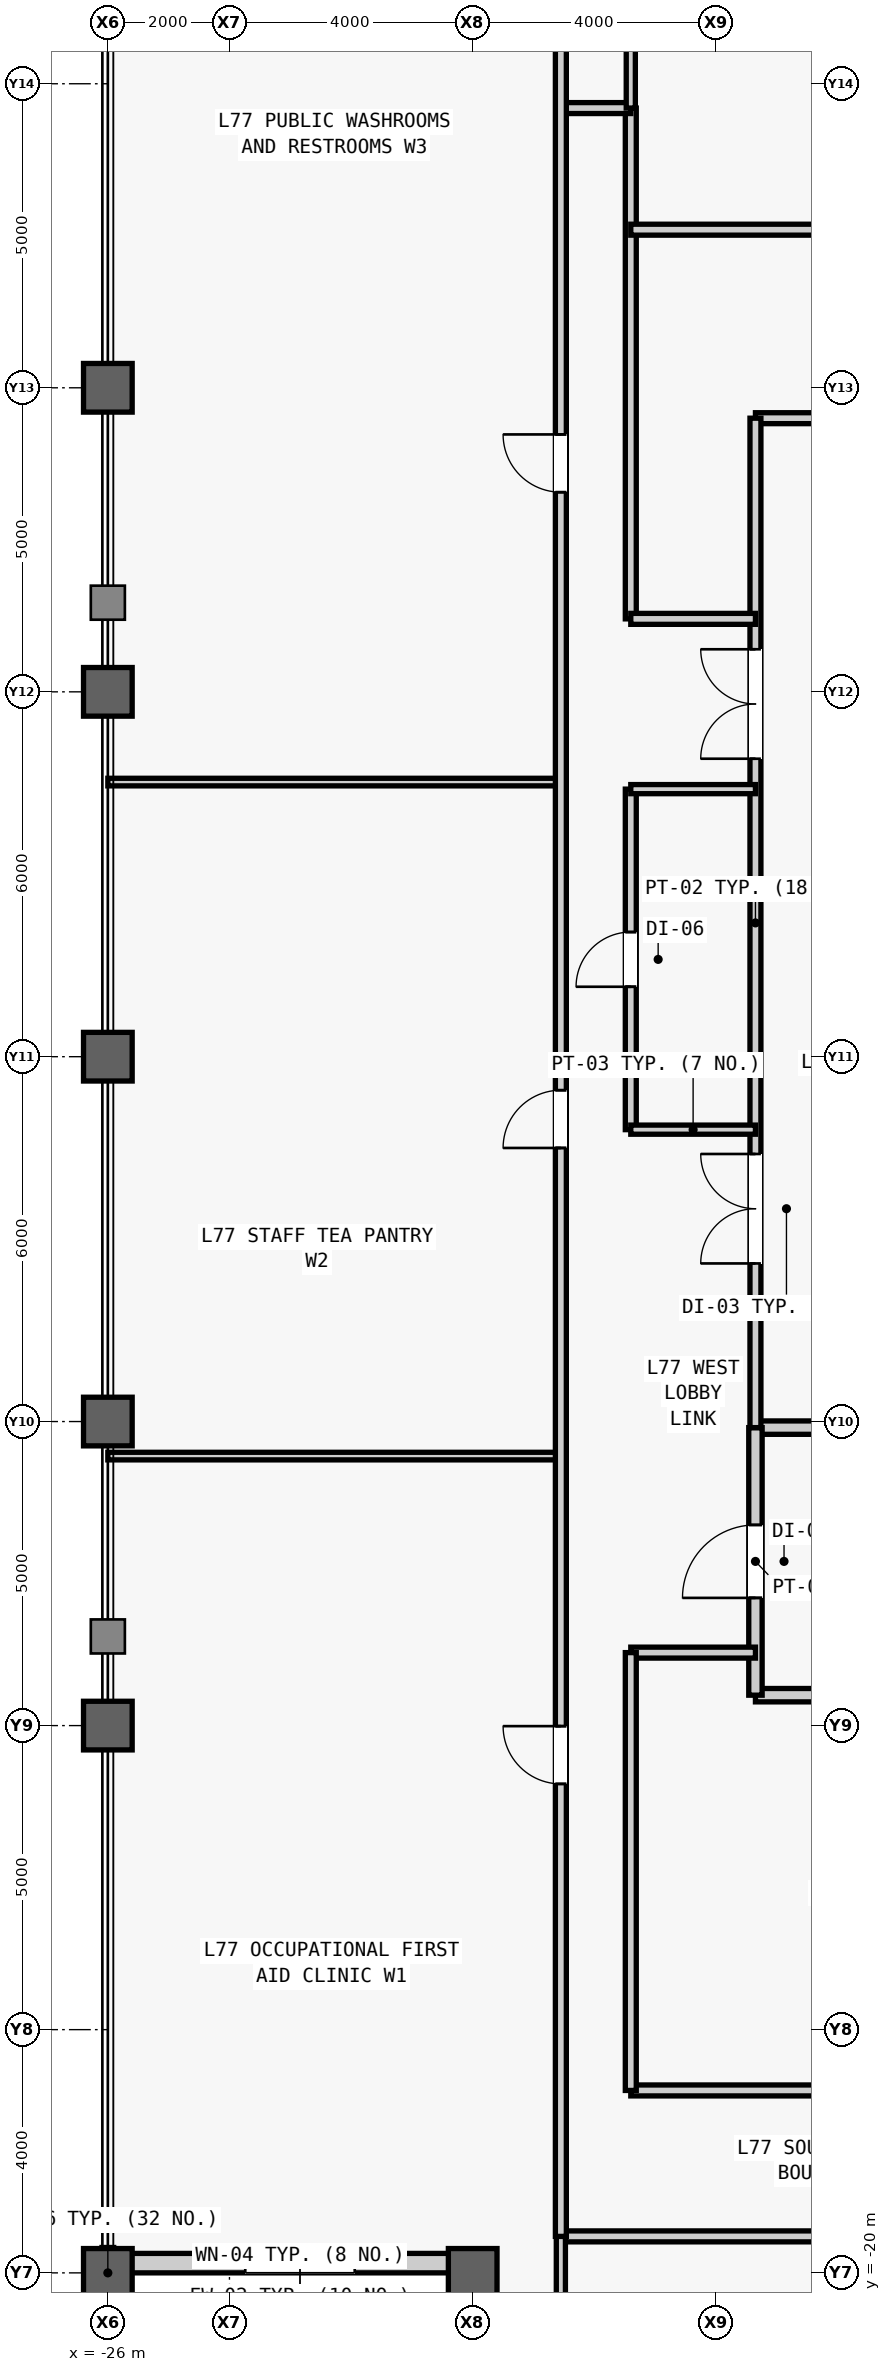
"""IFC4 building model, lengths in metres.
Left out: names, types, materials, properties, quantities, classifications, styles, units other than length and angle.
Written with IfcOpenShell. Run it as: python <this file> out.ifc"""

import sys

from ifc_helpers import new_model, si_unit, direction, frame, frame_2d, origin, origin_2d, place, context, subcontext, project, spatial, rectangle, hollow_rectangle, extrude, source, transform, mapped, element, fill, save


model = new_model("IFC4")
c1 = context("Model", 3, precision=1e-05, world=origin(), true_north=direction((0.0, 1.0)))
c2 = subcontext(c1, "Body", "Model", "MODEL_VIEW")
j1 = project(units=[si_unit("LENGTHUNIT", "METRE"), si_unit("PLANEANGLEUNIT", "RADIAN")], contexts=[c1])
p1 = place(None, origin())
s1 = spatial("IfcSite", under=j1, at=p1, CompositionType="ELEMENT")
p2 = place(p1, origin())
s2 = spatial("IfcBuilding", under=s1, at=p2, CompositionType="ELEMENT")
p3 = place(p2, frame((0.0, 0.0, 326.3)))
s3 = spatial("IfcBuildingStorey", under=s2, at=p3, CompositionType="ELEMENT", Elevation=326.3)
m1 = source(origin(), c2, "Body", "SweptSolid", [
    extrude(hollow_rectangle(XDim=0.8, YDim=0.8, WallThickness=0.045, at=origin_2d()), origin(), (0.0, 0.0, 1.0), 4.0),
])
for number, where, z_axis, x_axis in (
    (1, (-26.0, -20.0, 0.0), (0.0, 0.0, 1.0), (1.0, 0.0, 0.0)),
    (2, (-26.0, -11.0, 0.0), (0.0, 0.0, 1.0), (1.0, 0.0, 0.0)),
    (3, (-26.0, -6.0, 0.0), (0.0, 0.0, 1.0), (1.0, 0.0, 0.0)),
    (4, (-26.0, 0.0, 0.0), (0.0, 0.0, 1.0), (1.0, 0.0, 0.0)),
    (5, (-26.0, 6.0, 0.0), (0.0, 0.0, 1.0), (1.0, 0.0, 0.0)),
    (6, (-26.0, 11.0, 0.0), (0.0, 0.0, 1.0), (1.0, 0.0, 0.0)),
    (7, (-20.0, -20.0, 0.0), (0.0, 0.0, 1.0), (1.0, 0.0, 0.0)),
):
    element("IfcColumn", number, at=place(p3, frame(where, z_axis=z_axis, x_axis=x_axis)), inside=s3, PredefinedType="COLUMN", context=c2, shape_type="MappedRepresentation", body=[
        mapped(m1, transform((0.0, 0.0, 0.0), scale=1.0)),
    ])
m2 = source(origin(), c2, "Body", "SweptSolid", [
    extrude(rectangle(XDim=5.68, YDim=0.32, at=frame_2d((2.84, 0.0))), origin(), (0.0, 0.0, 1.0), 3.191),
])
p4 = place(p3, frame((-20.0, -19.84, 0.0), z_axis=(0.0, 0.0, 1.0), x_axis=(-1.0, 0.0, 0.0)))
e8 = element("IfcWall", 8, at=p4, inside=s3, PredefinedType="STANDARD", context=c2, shape_type="MappedRepresentation", body=[
    mapped(m2, transform((0.0, 0.0, 0.0), scale=1.0)),
])
m3 = source(origin(), c2, "Body", "SweptSolid", [
    extrude(rectangle(XDim=1.8, YDim=2.4, at=frame_2d((0.9, 1.2))), frame((0.0, 0.17, 0.0), z_axis=(0.0, -1.0, 0.0), x_axis=(1.0, 0.0, 0.0)), (0.0, 0.0, 1.0), 0.34),
])
p5 = place(p4, frame((1.94, 0.0, 0.5)))
e9 = element("IfcOpeningElement", 9, at=p5, cuts=e8, PredefinedType="OPENING", context=c2, shape_type="MappedRepresentation", body=[
    mapped(m3, transform((0.0, 0.0, 0.0), scale=1.0)),
])
p6 = place(p3, frame((-19.84, -25.68, 0.0), z_axis=(0.0, 0.0, 1.0), x_axis=(0.0, 1.0, 0.0)))
e10 = element("IfcWall", 10, at=p6, inside=s3, PredefinedType="STANDARD", context=c2, shape_type="MappedRepresentation", body=[
    mapped(m2, transform((0.0, 0.0, 0.0), scale=1.0)),
])
p7 = place(p6, frame((1.94, 0.0, 0.5)))
e11 = element("IfcOpeningElement", 11, at=p7, cuts=e10, PredefinedType="OPENING", context=c2, shape_type="MappedRepresentation", body=[
    mapped(m3, transform((0.0, 0.0, 0.0), scale=1.0)),
])
m4 = source(origin(), c2, "Body", "SweptSolid", [
    extrude(rectangle(XDim=4.05, YDim=0.22, at=frame_2d((2.025, 0.0))), origin(), (0.0, 0.0, 1.0), 3.74),
])
p8 = place(p3, frame((-15.35, -10.5, 0.0), z_axis=(0.0, 0.0, 1.0), x_axis=(1.0, 0.0, 0.0)))
e12 = element("IfcWall", 12, at=p8, inside=s3, PredefinedType="PARTITIONING", context=c2, shape_type="MappedRepresentation", body=[
    mapped(m4, transform((0.0, 0.0, 0.0), scale=1.0)),
])
m5 = source(origin(), c2, "Body", "SweptSolid", [
    extrude(rectangle(XDim=4.05, YDim=0.22, at=frame_2d((2.025, 0.0))), origin(), (0.0, 0.0, 1.0), 3.124),
])
p9 = place(p3, frame((-15.35, -6.1, 0.0), z_axis=(0.0, 0.0, 1.0), x_axis=(1.0, 0.0, 0.0)))
e13 = element("IfcWall", 13, at=p9, inside=s3, PredefinedType="PARTITIONING", context=c2, shape_type="MappedRepresentation", body=[
    mapped(m5, transform((0.0, 0.0, 0.0), scale=1.0)),
])
m6 = source(origin(), c2, "Body", "SweptSolid", [
    extrude(rectangle(XDim=4.4, YDim=0.22, at=frame_2d((2.2, 0.0))), origin(), (0.0, 0.0, 1.0), 3.74),
])
p10 = place(p3, frame((-15.35, -10.5, 0.0), z_axis=(0.0, 0.0, 1.0), x_axis=(0.0, 1.0, 0.0)))
e14 = element("IfcWall", 14, at=p10, inside=s3, PredefinedType="PARTITIONING", context=c2, shape_type="MappedRepresentation", body=[
    mapped(m6, transform((0.0, 0.0, 0.0), scale=1.0)),
])
m7 = source(origin(), c2, "Body", "SweptSolid", [
    extrude(rectangle(XDim=1.2, YDim=2.2, at=frame_2d((0.6, 1.1))), frame((0.0, 0.12, 0.0), z_axis=(0.0, -1.0, 0.0), x_axis=(1.0, 0.0, 0.0)), (0.0, 0.0, 1.0), 0.24),
])
p11 = place(p10, frame((1.6, 0.0, 0.0)))
e15 = element("IfcOpeningElement", 15, at=p11, cuts=e14, PredefinedType="OPENING", context=c2, shape_type="MappedRepresentation", body=[
    mapped(m7, transform((0.0, 0.0, 0.0), scale=1.0)),
])
m8 = source(origin(), c2, "Body", "SweptSolid", [
    extrude(rectangle(XDim=4.05, YDim=0.18, at=frame_2d((2.025, 0.0))), origin(), (0.0, 0.0, 1.0), 3.74),
])
p12 = place(p3, frame((-15.35, 10.5, 0.0), z_axis=(0.0, 0.0, 1.0), x_axis=(1.0, 0.0, 0.0)))
e16 = element("IfcWall", 16, at=p12, inside=s3, PredefinedType="PARTITIONING", context=c2, shape_type="MappedRepresentation", body=[
    mapped(m8, transform((0.0, 0.0, 0.0), scale=1.0)),
])
m9 = source(origin(), c2, "Body", "SweptSolid", [
    extrude(rectangle(XDim=16.6, YDim=0.18, at=frame_2d((8.3, 0.0))), origin(), (0.0, 0.0, 1.0), 3.74),
])
p13 = place(p3, frame((-15.35, -6.1, 0.0), z_axis=(0.0, 0.0, 1.0), x_axis=(0.0, 1.0, 0.0)))
e17 = element("IfcWall", 17, at=p13, inside=s3, PredefinedType="PARTITIONING", context=c2, shape_type="MappedRepresentation", body=[
    mapped(m9, transform((0.0, 0.0, 0.0), scale=1.0)),
])
m10 = source(origin(), c2, "Body", "SweptSolid", [
    extrude(rectangle(XDim=1.8, YDim=2.25, at=frame_2d((0.9, 1.125))), frame((0.0, 0.1, 0.0), z_axis=(0.0, -1.0, 0.0), x_axis=(1.0, 0.0, 0.0)), (0.0, 0.0, 1.0), 0.2),
])
p14 = place(p13, frame((2.7, 0.0, 0.0)))
e18 = element("IfcOpeningElement", 18, at=p14, cuts=e17, PredefinedType="OPENING", context=c2, shape_type="MappedRepresentation", body=[
    mapped(m10, transform((0.0, 0.0, 0.0), scale=1.0)),
])
p15 = place(p13, frame((11.0, 0.0, 0.0)))
e19 = element("IfcOpeningElement", 19, at=p15, cuts=e17, PredefinedType="OPENING", context=c2, shape_type="MappedRepresentation", body=[
    mapped(m10, transform((0.0, 0.0, 0.0), scale=1.0)),
])
m11 = source(origin(), c2, "Body", "SweptSolid", [
    extrude(rectangle(XDim=5.6, YDim=0.18, at=frame_2d((2.8, 0.0))), origin(), (0.0, 0.0, 1.0), 3.74),
])
p16 = place(p3, frame((-17.4, -1.2, 0.0), z_axis=(0.0, 0.0, 1.0), x_axis=(0.0, 1.0, 0.0)))
e20 = element("IfcWall", 20, at=p16, inside=s3, PredefinedType="PARTITIONING", context=c2, shape_type="MappedRepresentation", body=[
    mapped(m11, transform((0.0, 0.0, 0.0), scale=1.0)),
])
m12 = source(origin(), c2, "Body", "SweptSolid", [
    extrude(rectangle(XDim=0.9, YDim=2.15, at=frame_2d((0.45, 1.075))), frame((0.0, 0.1, 0.0), z_axis=(0.0, -1.0, 0.0), x_axis=(1.0, 0.0, 0.0)), (0.0, 0.0, 1.0), 0.2),
])
p17 = place(p16, frame((2.35, 0.0, 0.0)))
e21 = element("IfcOpeningElement", 21, at=p17, cuts=e20, PredefinedType="OPENING", context=c2, shape_type="MappedRepresentation", body=[
    mapped(m12, transform((0.0, 0.0, 0.0), scale=1.0)),
])
m13 = source(origin(), c2, "Body", "SweptSolid", [
    extrude(rectangle(XDim=2.05, YDim=0.15, at=frame_2d((1.025, 0.0))), origin(), (0.0, 0.0, 1.0), 3.74),
])
for number, where, z_axis, x_axis in (
    (22, (-17.4, -1.2, 0.0), (0.0, 0.0, 1.0), (1.0, 0.0, 0.0)),
    (23, (-17.4, 4.4, 0.0), (0.0, 0.0, 1.0), (1.0, 0.0, 0.0)),
):
    element("IfcWall", number, at=place(p3, frame(where, z_axis=z_axis, x_axis=x_axis)), inside=s3, PredefinedType="PARTITIONING", context=c2, shape_type="MappedRepresentation", body=[
        mapped(m13, transform((0.0, 0.0, 0.0), scale=1.0)),
    ])
m14 = source(origin(), c2, "Body", "SweptSolid", [
    extrude(rectangle(XDim=2.05, YDim=0.18, at=frame_2d((1.025, 0.0))), origin(), (0.0, 0.0, 1.0), 3.74),
])
p18 = place(p3, frame((-17.4, -9.8, 0.0), z_axis=(0.0, 0.0, 1.0), x_axis=(1.0, 0.0, 0.0)))
e24 = element("IfcWall", 24, at=p18, inside=s3, PredefinedType="PARTITIONING", context=c2, shape_type="MappedRepresentation", body=[
    mapped(m14, transform((0.0, 0.0, 0.0), scale=1.0)),
])
m15 = source(origin(), c2, "Body", "SweptSolid", [
    extrude(rectangle(XDim=8.4, YDim=0.18, at=frame_2d((4.2, 0.0))), origin(), (0.0, 0.0, 1.0), 3.74),
])
p19 = place(p3, frame((-17.4, 7.2, 0.0), z_axis=(0.0, 0.0, 1.0), x_axis=(0.0, 1.0, 0.0)))
e25 = element("IfcWall", 25, at=p19, inside=s3, PredefinedType="PARTITIONING", context=c2, shape_type="MappedRepresentation", body=[
    mapped(m15, transform((0.0, 0.0, 0.0), scale=1.0)),
])
p20 = place(p3, frame((-17.4, 7.2, 0.0), z_axis=(0.0, 0.0, 1.0), x_axis=(1.0, 0.0, 0.0)))
e26 = element("IfcWall", 26, at=p20, inside=s3, PredefinedType="PARTITIONING", context=c2, shape_type="MappedRepresentation", body=[
    mapped(m14, transform((0.0, 0.0, 0.0), scale=1.0)),
])
m16 = source(origin(), c2, "Body", "SweptSolid", [
    extrude(rectangle(XDim=16.1, YDim=0.18, at=frame_2d((8.05, 0.0))), origin(), (0.0, 0.0, 1.0), 3.74),
])
p21 = place(p3, frame((-17.4, -17.0, 0.0), z_axis=(0.0, 0.0, 1.0), x_axis=(1.0, 0.0, 0.0)))
e27 = element("IfcWall", 27, at=p21, inside=s3, PredefinedType="PARTITIONING", context=c2, shape_type="MappedRepresentation", body=[
    mapped(m16, transform((0.0, 0.0, 0.0), scale=1.0)),
])
p22 = place(p21, frame((8.95, 0.0, 0.0)))
e28 = element("IfcOpeningElement", 28, at=p22, cuts=e27, PredefinedType="OPENING", context=c2, shape_type="MappedRepresentation", body=[
    mapped(m12, transform((0.0, 0.0, 0.0), scale=1.0)),
])
m17 = source(origin(), c2, "Body", "SweptSolid", [
    extrude(rectangle(XDim=7.2, YDim=0.18, at=frame_2d((3.6, 0.0))), origin(), (0.0, 0.0, 1.0), 3.74),
])
p23 = place(p3, frame((-17.4, -17.0, 0.0), z_axis=(0.0, 0.0, 1.0), x_axis=(0.0, 1.0, 0.0)))
e29 = element("IfcWall", 29, at=p23, inside=s3, PredefinedType="PARTITIONING", context=c2, shape_type="MappedRepresentation", body=[
    mapped(m17, transform((0.0, 0.0, 0.0), scale=1.0)),
])
m18 = source(origin(), c2, "Body", "SweptSolid", [
    extrude(rectangle(XDim=1.15, YDim=0.18, at=frame_2d((0.575, 0.0))), origin(), (0.0, 0.0, 1.0), 3.74),
])
p24 = place(p3, frame((-18.55, 15.6, 0.0), z_axis=(0.0, 0.0, 1.0), x_axis=(1.0, 0.0, 0.0)))
e30 = element("IfcWall", 30, at=p24, inside=s3, PredefinedType="PARTITIONING", context=c2, shape_type="MappedRepresentation", body=[
    mapped(m18, transform((0.0, 0.0, 0.0), scale=1.0)),
])
m19 = source(origin(), c2, "Body", "SweptSolid", [
    extrude(rectangle(XDim=36.3, YDim=0.18, at=frame_2d((18.15, 0.0))), origin(), (0.0, 0.0, 1.0), 3.393),
])
p25 = place(p3, frame((-18.55, -19.4, 0.0), z_axis=(0.0, 0.0, 1.0), x_axis=(1.0, 0.0, 0.0)))
e31 = element("IfcWall", 31, at=p25, inside=s3, PredefinedType="PARTITIONING", context=c2, shape_type="MappedRepresentation", body=[
    mapped(m19, transform((0.0, 0.0, 0.0), scale=1.0)),
])
m20 = source(origin(), c2, "Body", "SweptSolid", [
    extrude(rectangle(XDim=1.05, YDim=2.2, at=frame_2d((0.525, 1.1))), frame((0.0, 0.1, 0.0), z_axis=(0.0, -1.0, 0.0), x_axis=(1.0, 0.0, 0.0)), (0.0, 0.0, 1.0), 0.2),
])
p26 = place(p25, frame((17.6, 0.0, 0.0)))
e32 = element("IfcOpeningElement", 32, at=p26, cuts=e31, PredefinedType="OPENING", context=c2, shape_type="MappedRepresentation", body=[
    mapped(m20, transform((0.0, 0.0, 0.0), scale=1.0)),
])
m21 = source(origin(), c2, "Body", "SweptSolid", [
    extrude(rectangle(XDim=6.6, YDim=0.15, at=frame_2d((3.3, 0.0))), origin(), (0.0, 0.0, 1.0), 3.74),
])
p27 = place(p3, frame((-18.55, -26.0, 0.0), z_axis=(0.0, 0.0, 1.0), x_axis=(0.0, 1.0, 0.0)))
e33 = element("IfcWall", 33, at=p27, inside=s3, PredefinedType="PARTITIONING", context=c2, shape_type="MappedRepresentation", body=[
    mapped(m21, transform((0.0, 0.0, 0.0), scale=1.0)),
])
m22 = source(origin(), c2, "Body", "SweptSolid", [
    extrude(rectangle(XDim=32.75, YDim=0.18, at=frame_2d((16.375, 0.0))), origin(), (0.0, 0.0, 1.0), 3.74),
])
p28 = place(p3, frame((-17.4, 13.6, 0.0), z_axis=(0.0, 0.0, 1.0), x_axis=(1.0, 0.0, 0.0)))
e34 = element("IfcWall", 34, at=p28, inside=s3, PredefinedType="PARTITIONING", context=c2, shape_type="MappedRepresentation", body=[
    mapped(m22, transform((0.0, 0.0, 0.0), scale=1.0)),
])
p29 = place(p28, frame((27.075, 0.0, 0.0)))
e35 = element("IfcOpeningElement", 35, at=p29, cuts=e34, PredefinedType="OPENING", context=c2, shape_type="MappedRepresentation", body=[
    mapped(m20, transform((0.0, 0.0, 0.0), scale=1.0)),
])
m23 = source(origin(), c2, "Body", "SweptSolid", [
    extrude(rectangle(XDim=10.4, YDim=0.15, at=frame_2d((5.2, 0.0))), origin(), (0.0, 0.0, 1.0), 3.74),
])
p30 = place(p3, frame((-17.4, 15.6, 0.0), z_axis=(0.0, 0.0, 1.0), x_axis=(0.0, 1.0, 0.0)))
e36 = element("IfcWall", 36, at=p30, inside=s3, PredefinedType="PARTITIONING", context=c2, shape_type="MappedRepresentation", body=[
    mapped(m23, transform((0.0, 0.0, 0.0), scale=1.0)),
])
m24 = source(origin(), c2, "Body", "SweptSolid", [
    extrude(rectangle(XDim=7.45, YDim=0.125, at=frame_2d((3.725, 0.0))), origin(), (0.0, 0.0, 1.0), 3.74),
])
for number, where, z_axis, x_axis in (
    (37, (-26.0, -6.568, 0.0), (0.0, 0.0, 1.0), (1.0, 0.0, 0.0)),
    (38, (-26.0, 4.516, 0.0), (0.0, 0.0, 1.0), (1.0, 0.0, 0.0)),
):
    element("IfcWall", number, at=place(p3, frame(where, z_axis=z_axis, x_axis=x_axis)), inside=s3, PredefinedType="PARTITIONING", context=c2, shape_type="MappedRepresentation", body=[
        mapped(m24, transform((0.0, 0.0, 0.0), scale=1.0)),
    ])
m25 = source(origin(), c2, "Body", "SweptSolid", [
    extrude(rectangle(XDim=39.4, YDim=0.18, at=frame_2d((19.7, 0.0))), origin(), (0.0, 0.0, 1.0), 3.74),
])
p31 = place(p3, frame((-18.55, -19.4, 0.0), z_axis=(0.0, 0.0, 1.0), x_axis=(0.0, 1.0, 0.0)))
e39 = element("IfcWall", 39, at=p31, inside=s3, PredefinedType="PARTITIONING", context=c2, shape_type="MappedRepresentation", body=[
    mapped(m25, transform((0.0, 0.0, 0.0), scale=1.0)),
])
m26 = source(origin(), c2, "Body", "SweptSolid", [
    extrude(rectangle(XDim=0.95, YDim=2.15, at=frame_2d((0.475, 1.075))), frame((0.0, 0.1, 0.0), z_axis=(0.0, -1.0, 0.0), x_axis=(1.0, 0.0, 0.0)), (0.0, 0.0, 1.0), 0.2),
])
p32 = place(p31, frame((7.441, 0.0, 0.0)))
e40 = element("IfcOpeningElement", 40, at=p32, cuts=e39, PredefinedType="OPENING", context=c2, shape_type="MappedRepresentation", body=[
    mapped(m26, transform((0.0, 0.0, 0.0), scale=1.0)),
])
p33 = place(p31, frame((17.899, 0.0, 0.0)))
e41 = element("IfcOpeningElement", 41, at=p33, cuts=e39, PredefinedType="OPENING", context=c2, shape_type="MappedRepresentation", body=[
    mapped(m26, transform((0.0, 0.0, 0.0), scale=1.0)),
])
p34 = place(p31, frame((28.683, 0.0, 0.0)))
e42 = element("IfcOpeningElement", 42, at=p34, cuts=e39, PredefinedType="OPENING", context=c2, shape_type="MappedRepresentation", body=[
    mapped(m26, transform((0.0, 0.0, 0.0), scale=1.0)),
])
m27 = source(origin(), c2, "Body", "SweptSolid", [
    extrude(rectangle(XDim=1.8, YDim=2.4, at=frame_2d((0.9, 1.2))), frame((0.0, 0.03, 0.0), z_axis=(0.0, -1.0, 0.0), x_axis=(1.0, 0.0, 0.0)), (0.0, 0.0, 1.0), 0.06),
])
p35 = place(p5, origin())
e43 = element("IfcWindow", 43, at=p35, inside=s3, PartitioningType="SINGLE_PANEL", PredefinedType="WINDOW", context=c2, shape_type="MappedRepresentation", body=[
    mapped(m27, transform((0.0, 0.0, 0.0), scale=1.0)),
])
fill(e9, e43)
m28 = source(origin(), c2, "Body", "SweptSolid", [
    extrude(rectangle(XDim=1.2, YDim=2.2, at=frame_2d((0.6, 1.1))), frame((0.0, 0.025, 0.0), z_axis=(0.0, -1.0, 0.0), x_axis=(1.0, 0.0, 0.0)), (0.0, 0.0, 1.0), 0.05),
])
p36 = place(p11, origin())
e44 = element("IfcDoor", 44, at=p36, inside=s3, OperationType="SINGLE_SWING_LEFT", PredefinedType="DOOR", context=c2, shape_type="MappedRepresentation", body=[
    mapped(m28, transform((0.0, 0.0, 0.0), scale=1.0)),
])
fill(e15, e44)
m29 = source(origin(), c2, "Body", "SweptSolid", [
    extrude(rectangle(XDim=1.8, YDim=2.25, at=frame_2d((0.9, 1.125))), frame((0.0, 0.025, 0.0), z_axis=(0.0, -1.0, 0.0), x_axis=(1.0, 0.0, 0.0)), (0.0, 0.0, 1.0), 0.05),
])
p37 = place(p14, origin())
e45 = element("IfcDoor", 45, at=p37, inside=s3, OperationType="SINGLE_SWING_LEFT", PredefinedType="DOOR", context=c2, shape_type="MappedRepresentation", body=[
    mapped(m29, transform((0.0, 0.0, 0.0), scale=1.0)),
])
fill(e18, e45)
p38 = place(p15, origin())
e46 = element("IfcDoor", 46, at=p38, inside=s3, OperationType="SINGLE_SWING_RIGHT", PredefinedType="DOOR", context=c2, shape_type="MappedRepresentation", body=[
    mapped(m29, transform((0.0, 0.0, 0.0), scale=1.0)),
])
fill(e19, e46)
m30 = source(origin(), c2, "Body", "SweptSolid", [
    extrude(rectangle(XDim=0.9, YDim=2.15, at=frame_2d((0.45, 1.075))), frame((0.0, 0.025, 0.0), z_axis=(0.0, -1.0, 0.0), x_axis=(1.0, 0.0, 0.0)), (0.0, 0.0, 1.0), 0.05),
])
p39 = place(p17, origin())
e47 = element("IfcDoor", 47, at=p39, inside=s3, OperationType="SINGLE_SWING_LEFT", PredefinedType="DOOR", context=c2, shape_type="MappedRepresentation", body=[
    mapped(m30, transform((0.0, 0.0, 0.0), scale=1.0)),
])
fill(e21, e47)
m31 = source(origin(), c2, "Body", "SweptSolid", [
    extrude(rectangle(XDim=0.95, YDim=2.15, at=frame_2d((0.475, 1.075))), frame((0.0, 0.025, 0.0), z_axis=(0.0, -1.0, 0.0), x_axis=(1.0, 0.0, 0.0)), (0.0, 0.0, 1.0), 0.05),
])
p40 = place(p32, origin())
e48 = element("IfcDoor", 48, at=p40, inside=s3, OperationType="SINGLE_SWING_RIGHT", PredefinedType="DOOR", context=c2, shape_type="MappedRepresentation", body=[
    mapped(m31, transform((0.0, 0.0, 0.0), scale=1.0)),
])
fill(e40, e48)
p41 = place(p33, origin())
e49 = element("IfcDoor", 49, at=p41, inside=s3, OperationType="SINGLE_SWING_LEFT", PredefinedType="DOOR", context=c2, shape_type="MappedRepresentation", body=[
    mapped(m31, transform((0.0, 0.0, 0.0), scale=1.0)),
])
fill(e41, e49)
p42 = place(p34, origin())
e50 = element("IfcDoor", 50, at=p42, inside=s3, OperationType="SINGLE_SWING_RIGHT", PredefinedType="DOOR", context=c2, shape_type="MappedRepresentation", body=[
    mapped(m31, transform((0.0, 0.0, 0.0), scale=1.0)),
])
fill(e42, e50)
save(model, sys.argv[1])
